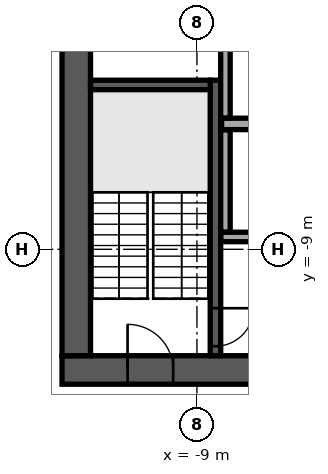
"""IFC4 building model, lengths in metres.
Left out: names, types, materials, properties, quantities, classifications, styles, units other than length and angle.
Written with IfcOpenShell. Run it as: python <this file> out.ifc"""

import sys

from ifc_helpers import new_model, si_unit, direction, frame, frame_2d, origin, place, context, subcontext, project, spatial, rectangle, extrude, element, fill, save


model = new_model("IFC4")
c1 = context("Model", 3, precision=1e-05, world=origin(), true_north=direction((0.0, 1.0)))
c2 = subcontext(c1, "Body", "Model", "MODEL_VIEW")
j1 = project(units=[si_unit("LENGTHUNIT", "METRE"), si_unit("PLANEANGLEUNIT", "RADIAN")], contexts=[c1])
p1 = place(None, origin())
s1 = spatial("IfcSite", under=j1, at=p1, CompositionType="ELEMENT")
p2 = place(p1, origin())
s2 = spatial("IfcBuilding", under=s1, at=p2, CompositionType="ELEMENT")
p3 = place(p2, frame((0.0, 0.0, 254.9)))
s3 = spatial("IfcBuildingStorey", under=s2, at=p3, CompositionType="ELEMENT", Elevation=254.9)
p4 = place(p3, frame((-12.55, -12.175, 0.0), z_axis=(0.0, 0.0, 1.0), x_axis=(1.0, 0.0, 0.0)))
e1 = element("IfcWall", 1, at=p4, inside=s3, PredefinedType="SHEAR", context=c2, shape_type="SweptSolid", body=[
    extrude(rectangle(XDim=25.1, YDim=0.75, at=frame_2d((12.55, 0.0))), origin(), (0.0, 0.0, 1.0), 3.64),
])
p5 = place(p4, frame((7.45, 0.0, 0.0)))
e2 = element("IfcOpeningElement", 2, at=p5, cuts=e1, PredefinedType="OPENING", context=c2, shape_type="SweptSolid", body=[
    extrude(rectangle(XDim=2.0, YDim=2.1, at=frame_2d((1.0, 1.05))), frame((0.0, 0.385, 0.0), z_axis=(0.0, -1.0, 0.0), x_axis=(1.0, 0.0, 0.0)), (0.0, 0.0, 1.0), 0.77),
])
p6 = place(p4, frame((17.575, 0.0, 0.0)))
e3 = element("IfcOpeningElement", 3, at=p6, cuts=e1, PredefinedType="OPENING", context=c2, shape_type="SweptSolid", body=[
    extrude(rectangle(XDim=1.2, YDim=2.1, at=frame_2d((0.6, 1.05))), frame((0.0, 0.385, 0.0), z_axis=(0.0, -1.0, 0.0), x_axis=(1.0, 0.0, 0.0)), (0.0, 0.0, 1.0), 0.77),
])
p7 = place(p4, frame((1.725, 0.0, 0.0)))
e4 = element("IfcOpeningElement", 4, at=p7, cuts=e1, PredefinedType="OPENING", context=c2, shape_type="SweptSolid", body=[
    extrude(rectangle(XDim=1.2, YDim=2.1, at=frame_2d((0.6, 1.05))), frame((0.0, 0.385, 0.0), z_axis=(0.0, -1.0, 0.0), x_axis=(1.0, 0.0, 0.0)), (0.0, 0.0, 1.0), 0.77),
])
p8 = place(p4, frame((22.175, 0.0, 0.0)))
e5 = element("IfcOpeningElement", 5, at=p8, cuts=e1, PredefinedType="OPENING", context=c2, shape_type="SweptSolid", body=[
    extrude(rectangle(XDim=1.2, YDim=2.1, at=frame_2d((0.6, 1.05))), frame((0.0, 0.385, 0.0), z_axis=(0.0, -1.0, 0.0), x_axis=(1.0, 0.0, 0.0)), (0.0, 0.0, 1.0), 0.77),
])
p9 = place(p3, frame((-12.175, -11.8, 0.0), z_axis=(0.0, 0.0, 1.0), x_axis=(0.0, 1.0, 0.0)))
e6 = element("IfcWall", 6, at=p9, inside=s3, PredefinedType="SHEAR", context=c2, shape_type="SweptSolid", body=[
    extrude(rectangle(XDim=23.6, YDim=0.75, at=frame_2d((11.8, 0.0))), origin(), (0.0, 0.0, 1.0), 3.64),
])
p10 = place(p9, frame((10.6, 0.0, 0.0)))
e7 = element("IfcOpeningElement", 7, at=p10, cuts=e6, PredefinedType="OPENING", context=c2, shape_type="SweptSolid", body=[
    extrude(rectangle(XDim=2.4, YDim=2.4, at=frame_2d((1.2, 1.2))), frame((0.0, 0.385, 0.0), z_axis=(0.0, -1.0, 0.0), x_axis=(1.0, 0.0, 0.0)), (0.0, 0.0, 1.0), 0.77),
])
p11 = place(p3, frame((-8.512, -4.55, 0.0), z_axis=(0.0, 0.0, 1.0), x_axis=(0.0, -1.0, 0.0)))
e8 = element("IfcWall", 8, at=p11, inside=s3, PredefinedType="SOLIDWALL", context=c2, shape_type="SweptSolid", body=[
    extrude(rectangle(XDim=7.25, YDim=0.275, at=frame_2d((3.625, 0.0))), origin(), (0.0, 0.0, 1.0), 3.64),
])
p12 = place(p11, frame((6.0, 0.0, 0.0)))
e9 = element("IfcOpeningElement", 9, at=p12, cuts=e8, PredefinedType="OPENING", context=c2, shape_type="SweptSolid", body=[
    extrude(rectangle(XDim=1.0, YDim=2.1, at=frame_2d((0.5, 1.05))), frame((0.0, 0.147, 0.0), z_axis=(0.0, -1.0, 0.0), x_axis=(1.0, 0.0, 0.0)), (0.0, 0.0, 1.0), 0.295),
])
p13 = place(p3, frame((-8.65, -4.675, 0.0), z_axis=(0.0, 0.0, 1.0), x_axis=(-1.0, 0.0, 0.0)))
e10 = element("IfcWall", 10, at=p13, inside=s3, PredefinedType="SOLIDWALL", context=c2, shape_type="SweptSolid", body=[
    extrude(rectangle(XDim=3.15, YDim=0.25, at=frame_2d((1.575, 0.0))), origin(), (0.0, 0.0, 1.0), 3.64),
])
p14 = place(p3, frame((-8.37, -8.675, 0.0), z_axis=(0.0, 0.0, 1.0), x_axis=(1.0, 0.0, 0.0)))
e11 = element("IfcWall", 11, at=p14, inside=s3, PredefinedType="PARTITIONING", context=c2, shape_type="SweptSolid", body=[
    extrude(rectangle(XDim=5.49, YDim=0.25, at=frame_2d((2.745, 0.0))), origin(), (0.0, 0.0, 1.0), 3.64),
])
p15 = place(p14, frame((0.995, 0.0, 0.0)))
e12 = element("IfcOpeningElement", 12, at=p15, cuts=e11, PredefinedType="OPENING", context=c2, shape_type="SweptSolid", body=[
    extrude(rectangle(XDim=1.0, YDim=2.1, at=frame_2d((0.5, 1.05))), frame((0.0, 0.135, 0.0), z_axis=(0.0, -1.0, 0.0), x_axis=(1.0, 0.0, 0.0)), (0.0, 0.0, 1.0), 0.27),
])
p16 = place(p14, frame((3.745, 0.0, 0.0)))
e13 = element("IfcOpeningElement", 13, at=p16, cuts=e11, PredefinedType="OPENING", context=c2, shape_type="SweptSolid", body=[
    extrude(rectangle(XDim=1.0, YDim=2.1, at=frame_2d((0.5, 1.05))), frame((0.0, 0.135, 0.0), z_axis=(0.0, -1.0, 0.0), x_axis=(1.0, 0.0, 0.0)), (0.0, 0.0, 1.0), 0.27),
])
p17 = place(p3, frame((-8.25, -8.545, 0.0), z_axis=(0.0, 0.0, 1.0), x_axis=(0.0, 1.0, 0.0)))
e14 = element("IfcWall", 14, at=p17, inside=s3, PredefinedType="PARTITIONING", context=c2, shape_type="SweptSolid", body=[
    extrude(rectangle(XDim=2.69, YDim=0.25, at=frame_2d((1.345, 0.0))), origin(), (0.0, 0.0, 1.0), 3.64),
])
p18 = place(p3, frame((-8.35, -5.7, 0.0), z_axis=(0.0, 0.0, 1.0), x_axis=(1.0, 0.0, 0.0)))
e15 = element("IfcWall", 15, at=p18, inside=s3, PredefinedType="PARTITIONING", context=c2, shape_type="SweptSolid", body=[
    extrude(rectangle(XDim=5.47, YDim=0.3, at=frame_2d((2.735, 0.0))), origin(), (0.0, 0.0, 1.0), 3.64),
])
p19 = place(p3, frame((-8.25, -5.545, 0.0), z_axis=(0.0, 0.0, 1.0), x_axis=(0.0, 1.0, 0.0)))
e16 = element("IfcWall", 16, at=p19, inside=s3, PredefinedType="PARTITIONING", context=c2, shape_type="SweptSolid", body=[
    extrude(rectangle(XDim=2.69, YDim=0.25, at=frame_2d((1.345, 0.0))), origin(), (0.0, 0.0, 1.0), 3.64),
])
p20 = place(p3, frame((-6.281, 33.292, 0.0), z_axis=(0.0, 0.0, 1.0), x_axis=(-0.544637268583, -0.838671715077, 0.0)))
e17 = element("IfcWall", 17, at=p20, inside=s3, PredefinedType="STANDARD", context=c2, shape_type="SweptSolid", body=[
    extrude(rectangle(XDim=48.843, YDim=0.6, at=frame_2d((24.422, 0.0))), origin(), (0.0, 0.0, 1.0), 3.64),
])
p21 = place(p20, frame((1.22, 0.0, 0.9)))
e18 = element("IfcOpeningElement", 18, at=p21, cuts=e17, PredefinedType="OPENING", context=c2, shape_type="SweptSolid", body=[
    extrude(rectangle(XDim=2.0, YDim=2.1, at=frame_2d((1.0, 1.05))), frame((0.0, 0.31, 0.0), z_axis=(0.0, -1.0, 0.0), x_axis=(1.0, 0.0, 0.0)), (0.0, 0.0, 1.0), 0.62),
])
p22 = place(p20, frame((5.66, 0.0, 0.9)))
e19 = element("IfcOpeningElement", 19, at=p22, cuts=e17, PredefinedType="OPENING", context=c2, shape_type="SweptSolid", body=[
    extrude(rectangle(XDim=2.0, YDim=2.1, at=frame_2d((1.0, 1.05))), frame((0.0, 0.31, 0.0), z_axis=(0.0, -1.0, 0.0), x_axis=(1.0, 0.0, 0.0)), (0.0, 0.0, 1.0), 0.62),
])
p23 = place(p20, frame((14.541, 0.0, 0.9)))
e20 = element("IfcOpeningElement", 20, at=p23, cuts=e17, PredefinedType="OPENING", context=c2, shape_type="SweptSolid", body=[
    extrude(rectangle(XDim=2.0, YDim=2.1, at=frame_2d((1.0, 1.05))), frame((0.0, 0.31, 0.0), z_axis=(0.0, -1.0, 0.0), x_axis=(1.0, 0.0, 0.0)), (0.0, 0.0, 1.0), 0.62),
])
p24 = place(p20, frame((18.981, 0.0, 0.9)))
e21 = element("IfcOpeningElement", 21, at=p24, cuts=e17, PredefinedType="OPENING", context=c2, shape_type="SweptSolid", body=[
    extrude(rectangle(XDim=2.0, YDim=2.1, at=frame_2d((1.0, 1.05))), frame((0.0, 0.31, 0.0), z_axis=(0.0, -1.0, 0.0), x_axis=(1.0, 0.0, 0.0)), (0.0, 0.0, 1.0), 0.62),
])
p25 = place(p20, frame((23.422, 0.0, 0.9)))
e22 = element("IfcOpeningElement", 22, at=p25, cuts=e17, PredefinedType="OPENING", context=c2, shape_type="SweptSolid", body=[
    extrude(rectangle(XDim=2.0, YDim=2.1, at=frame_2d((1.0, 1.05))), frame((0.0, 0.31, 0.0), z_axis=(0.0, -1.0, 0.0), x_axis=(1.0, 0.0, 0.0)), (0.0, 0.0, 1.0), 0.62),
])
p26 = place(p20, frame((27.862, 0.0, 0.9)))
e23 = element("IfcOpeningElement", 23, at=p26, cuts=e17, PredefinedType="OPENING", context=c2, shape_type="SweptSolid", body=[
    extrude(rectangle(XDim=2.0, YDim=2.1, at=frame_2d((1.0, 1.05))), frame((0.0, 0.31, 0.0), z_axis=(0.0, -1.0, 0.0), x_axis=(1.0, 0.0, 0.0)), (0.0, 0.0, 1.0), 0.62),
])
p27 = place(p20, frame((32.302, 0.0, 0.9)))
e24 = element("IfcOpeningElement", 24, at=p27, cuts=e17, PredefinedType="OPENING", context=c2, shape_type="SweptSolid", body=[
    extrude(rectangle(XDim=2.0, YDim=2.1, at=frame_2d((1.0, 1.05))), frame((0.0, 0.31, 0.0), z_axis=(0.0, -1.0, 0.0), x_axis=(1.0, 0.0, 0.0)), (0.0, 0.0, 1.0), 0.62),
])
p28 = place(p20, frame((36.742, 0.0, 0.9)))
e25 = element("IfcOpeningElement", 25, at=p28, cuts=e17, PredefinedType="OPENING", context=c2, shape_type="SweptSolid", body=[
    extrude(rectangle(XDim=2.0, YDim=2.1, at=frame_2d((1.0, 1.05))), frame((0.0, 0.31, 0.0), z_axis=(0.0, -1.0, 0.0), x_axis=(1.0, 0.0, 0.0)), (0.0, 0.0, 1.0), 0.62),
])
p29 = place(p20, frame((41.183, 0.0, 0.9)))
e26 = element("IfcOpeningElement", 26, at=p29, cuts=e17, PredefinedType="OPENING", context=c2, shape_type="SweptSolid", body=[
    extrude(rectangle(XDim=2.0, YDim=2.1, at=frame_2d((1.0, 1.05))), frame((0.0, 0.31, 0.0), z_axis=(0.0, -1.0, 0.0), x_axis=(1.0, 0.0, 0.0)), (0.0, 0.0, 1.0), 0.62),
])
p30 = place(p20, frame((45.623, 0.0, 0.9)))
e27 = element("IfcOpeningElement", 27, at=p30, cuts=e17, PredefinedType="OPENING", context=c2, shape_type="SweptSolid", body=[
    extrude(rectangle(XDim=2.0, YDim=2.1, at=frame_2d((1.0, 1.05))), frame((0.0, 0.31, 0.0), z_axis=(0.0, -1.0, 0.0), x_axis=(1.0, 0.0, 0.0)), (0.0, 0.0, 1.0), 0.62),
])
p31 = place(p3, frame((-26.791, -5.221, 0.0), z_axis=(0.0, 0.0, 1.0), x_axis=(0.838671905754, -0.544636974965, 0.0)))
e28 = element("IfcWall", 28, at=p31, inside=s3, PredefinedType="PARTITIONING", context=c2, shape_type="SweptSolid", body=[
    extrude(rectangle(XDim=39.325, YDim=0.15, at=frame_2d((19.663, 0.0))), origin(), (0.0, 0.0, 1.0), 3.04),
])
p32 = place(p31, frame((2.05, 0.0, 0.0)))
e29 = element("IfcOpeningElement", 29, at=p32, cuts=e28, PredefinedType="OPENING", context=c2, shape_type="SweptSolid", body=[
    extrude(rectangle(XDim=1.0, YDim=2.1, at=frame_2d((0.5, 1.05))), frame((0.0, 0.085, 0.0), z_axis=(0.0, -1.0, 0.0), x_axis=(1.0, 0.0, 0.0)), (0.0, 0.0, 1.0), 0.17),
])
p33 = place(p31, frame((9.807, 0.0, 0.0)))
e30 = element("IfcOpeningElement", 30, at=p33, cuts=e28, PredefinedType="OPENING", context=c2, shape_type="SweptSolid", body=[
    extrude(rectangle(XDim=1.0, YDim=2.1, at=frame_2d((0.5, 1.05))), frame((0.0, 0.085, 0.0), z_axis=(0.0, -1.0, 0.0), x_axis=(1.0, 0.0, 0.0)), (0.0, 0.0, 1.0), 0.17),
])
p34 = place(p31, frame((18.866, 0.0, 0.0)))
e31 = element("IfcOpeningElement", 31, at=p34, cuts=e28, PredefinedType="OPENING", context=c2, shape_type="SweptSolid", body=[
    extrude(rectangle(XDim=1.0, YDim=2.1, at=frame_2d((0.5, 1.05))), frame((0.0, 0.085, 0.0), z_axis=(0.0, -1.0, 0.0), x_axis=(1.0, 0.0, 0.0)), (0.0, 0.0, 1.0), 0.17),
])
p35 = place(p31, frame((25.009, 0.0, 0.0)))
e32 = element("IfcOpeningElement", 32, at=p35, cuts=e28, PredefinedType="OPENING", context=c2, shape_type="SweptSolid", body=[
    extrude(rectangle(XDim=1.0, YDim=2.1, at=frame_2d((0.5, 1.05))), frame((0.0, 0.085, 0.0), z_axis=(0.0, -1.0, 0.0), x_axis=(1.0, 0.0, 0.0)), (0.0, 0.0, 1.0), 0.17),
])
p36 = place(p31, frame((36.069, 0.0, 0.0)))
e33 = element("IfcOpeningElement", 33, at=p36, cuts=e28, PredefinedType="OPENING", context=c2, shape_type="SweptSolid", body=[
    extrude(rectangle(XDim=1.8, YDim=2.1, at=frame_2d((0.9, 1.05))), frame((0.0, 0.085, 0.0), z_axis=(0.0, -1.0, 0.0), x_axis=(1.0, 0.0, 0.0)), (0.0, 0.0, 1.0), 0.17),
])
p37 = place(p7, origin())
e34 = element("IfcDoor", 34, at=p37, inside=s3, OperationType="SINGLE_SWING_LEFT", PredefinedType="DOOR", context=c2, shape_type="SweptSolid", body=[
    extrude(rectangle(XDim=1.2, YDim=2.1, at=frame_2d((0.6, 1.05))), frame((0.0, 0.025, 0.0), z_axis=(0.0, -1.0, 0.0), x_axis=(1.0, 0.0, 0.0)), (0.0, 0.0, 1.0), 0.05),
])
fill(e4, e34)
p38 = place(p12, origin())
e35 = element("IfcDoor", 35, at=p38, inside=s3, OperationType="SINGLE_SWING_LEFT", PredefinedType="DOOR", context=c2, shape_type="SweptSolid", body=[
    extrude(rectangle(XDim=1.0, YDim=2.1, at=frame_2d((0.5, 1.05))), frame((0.0, 0.025, 0.0), z_axis=(0.0, -1.0, 0.0), x_axis=(1.0, 0.0, 0.0)), (0.0, 0.0, 1.0), 0.05),
])
fill(e9, e35)
save(model, sys.argv[1])
